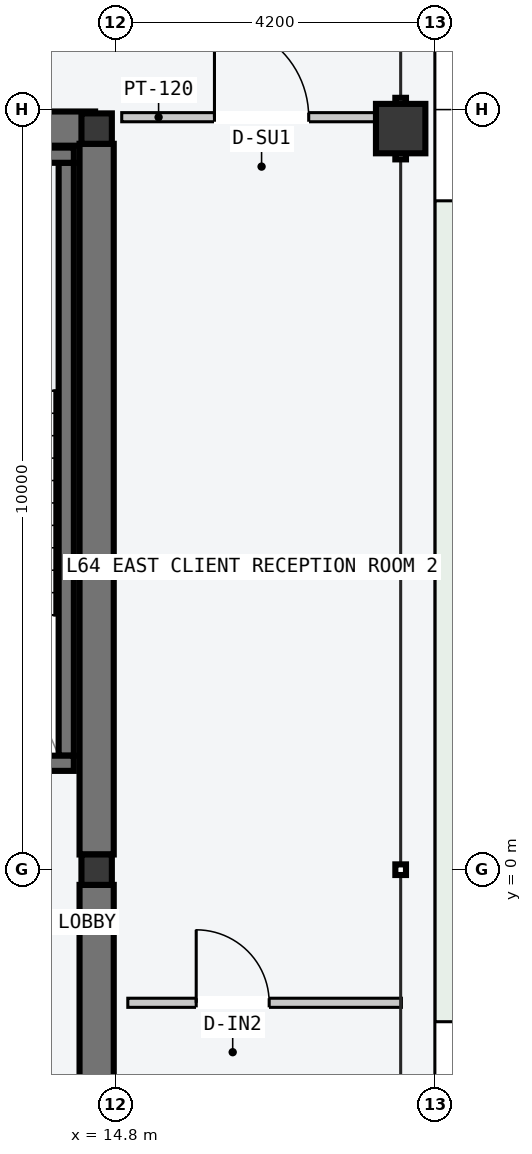
"""IFC4 building model, lengths in metres.
Left out: names, types, materials, properties, quantities, classifications, styles, units other than length and angle.
Written with IfcOpenShell. Run it as: python <this file> out.ifc"""

import sys

from ifc_helpers import new_model, si_unit, direction, frame, frame_2d, origin, origin_2d, place, context, subcontext, project, spatial, rectangle, hollow_rectangle, i_section, extrude, element, fill, save


model = new_model("IFC4")
c1 = context("Model", 3, precision=1e-05, world=origin(), true_north=direction((0.0, 1.0)))
c2 = subcontext(c1, "Body", "Model", "MODEL_VIEW")
j1 = project(units=[si_unit("LENGTHUNIT", "METRE"), si_unit("PLANEANGLEUNIT", "RADIAN")], contexts=[c1])
p1 = place(None, origin())
s1 = spatial("IfcSite", under=j1, at=p1, CompositionType="ELEMENT")
p2 = place(p1, origin())
s2 = spatial("IfcBuilding", under=s1, at=p2, CompositionType="ELEMENT")
p3 = place(p2, frame((0.0, 0.0, 243.6)))
s3 = spatial("IfcBuildingStorey", under=s2, at=p3, CompositionType="ELEMENT", Elevation=243.6)
p4 = place(p3, frame((8.07, 9.75, -0.2), z_axis=(0.0, 0.0, 1.0), x_axis=(1.0, 0.0, 0.0)))
e1 = element("IfcWall", 1, at=p4, inside=s3, PredefinedType="SHEAR", context=c2, shape_type="SweptSolid", body=[
    extrude(rectangle(XDim=6.46, YDim=0.45, at=frame_2d((3.23, 0.0))), origin(), (0.0, 0.0, 1.0), 3.6),
])
for number, where, z_axis, x_axis in (
    (2, (14.55, -9.55, -0.2), (0.0, 0.0, 1.0), (0.0, 1.0, 0.0)),
    (3, (14.55, 0.2, -0.2), (0.0, 0.0, 1.0), (0.0, 1.0, 0.0)),
):
    element("IfcWall", number, at=place(p3, frame(where, z_axis=z_axis, x_axis=x_axis)), inside=s3, PredefinedType="SHEAR", context=c2, shape_type="SweptSolid", body=[
        extrude(rectangle(XDim=9.35, YDim=0.45, at=frame_2d((4.675, 0.0))), origin(), (0.0, 0.0, 1.0), 3.6),
    ])
p5 = place(p3, frame((14.15, 1.5, -0.2), z_axis=(0.0, 0.0, 1.0), x_axis=(0.0, 1.0, 0.0)))
e4 = element("IfcWall", 4, at=p5, inside=s3, PredefinedType="SOLIDWALL", context=c2, shape_type="SweptSolid", body=[
    extrude(rectangle(XDim=7.8, YDim=0.2, at=frame_2d((3.9, 0.0))), origin(), (0.0, 0.0, 1.0), 3.6),
])
p6 = place(p3, frame((10.53, 1.4, -0.2), z_axis=(0.0, 0.0, 1.0), x_axis=(1.0, 0.0, 0.0)))
e5 = element("IfcWall", 5, at=p6, inside=s3, PredefinedType="SOLIDWALL", context=c2, shape_type="SweptSolid", body=[
    extrude(rectangle(XDim=3.72, YDim=0.2, at=frame_2d((1.86, 0.0))), origin(), (0.0, 0.0, 1.0), 3.6),
])
p7 = place(p6, frame((1.5, 0.0, 0.2)))
e6 = element("IfcOpeningElement", 6, at=p7, cuts=e5, PredefinedType="OPENING", context=c2, shape_type="SweptSolid", body=[
    extrude(rectangle(XDim=1.12, YDim=2.18, at=frame_2d((0.56, 1.09))), frame((0.0, 0.11, 0.0), z_axis=(0.0, -1.0, 0.0), x_axis=(1.0, 0.0, 0.0)), (0.0, 0.0, 1.0), 0.22),
])
p8 = place(p3, frame((10.53, 9.4, -0.2), z_axis=(0.0, 0.0, 1.0), x_axis=(1.0, 0.0, 0.0)))
e7 = element("IfcWall", 7, at=p8, inside=s3, PredefinedType="SOLIDWALL", context=c2, shape_type="SweptSolid", body=[
    extrude(rectangle(XDim=3.72, YDim=0.2, at=frame_2d((1.86, 0.0))), origin(), (0.0, 0.0, 1.0), 3.6),
])
for number, where, z_axis, x_axis in (
    (8, (14.55, 0.0, 0.0), (0.0, 0.0, 1.0), (1.0, 0.0, 0.0)),
    (9, (14.55, 9.75, 0.0), (0.0, 0.0, 1.0), (1.0, 0.0, 0.0)),
):
    element("IfcColumn", number, at=place(p3, frame(where, z_axis=z_axis, x_axis=x_axis)), inside=s3, PredefinedType="COLUMN", context=c2, shape_type="SweptSolid", body=[
        extrude(i_section(OverallWidth=0.4, OverallDepth=0.4, WebThickness=0.013, FlangeThickness=0.021, at=origin_2d()), origin(), (0.0, 0.0, 1.0), 3.6),
    ])
p9 = place(p3, frame((18.55, 9.75, 0.0), z_axis=(0.0, 0.0, 1.0), x_axis=(0.0, 1.0, 0.0)))
e10 = element("IfcColumn", 10, at=p9, inside=s3, PredefinedType="COLUMN", context=c2, shape_type="SweptSolid", body=[
    extrude(hollow_rectangle(XDim=0.65, YDim=0.65, WallThickness=0.028, at=origin_2d()), origin(), (0.0, 0.0, 1.0), 3.6),
])
p10 = place(p3, frame((14.88, 9.9, 0.0), z_axis=(0.0, 0.0, 1.0), x_axis=(1.0, 0.0, 0.0)))
e11 = element("IfcWall", 11, at=p10, inside=s3, PredefinedType="PARTITIONING", context=c2, shape_type="SweptSolid", body=[
    extrude(rectangle(XDim=3.68, YDim=0.12, at=frame_2d((1.84, 0.0))), origin(), (0.0, 0.0, 1.0), 3.4),
])
p11 = place(p10, frame((1.22, 0.0, 0.0)))
e12 = element("IfcOpeningElement", 12, at=p11, cuts=e11, PredefinedType="OPENING", context=c2, shape_type="SweptSolid", body=[
    extrude(rectangle(XDim=1.24, YDim=2.24, at=frame_2d((0.62, 1.12))), frame((0.0, 0.07, 0.0), z_axis=(0.0, -1.0, 0.0), x_axis=(1.0, 0.0, 0.0)), (0.0, 0.0, 1.0), 0.14),
])
p12 = place(p3, frame((14.96, -1.751, 0.0), z_axis=(0.0, 0.0, 1.0), x_axis=(1.0, 0.0, 0.0)))
e13 = element("IfcWall", 13, at=p12, inside=s3, PredefinedType="PARTITIONING", context=c2, shape_type="SweptSolid", body=[
    extrude(rectangle(XDim=3.6, YDim=0.12, at=frame_2d((1.8, 0.0))), origin(), (0.0, 0.0, 1.0), 3.4),
])
p13 = place(p12, frame((0.9, 0.0, 0.0)))
e14 = element("IfcOpeningElement", 14, at=p13, cuts=e13, PredefinedType="OPENING", context=c2, shape_type="SweptSolid", body=[
    extrude(rectangle(XDim=0.96, YDim=2.18, at=frame_2d((0.48, 1.09))), frame((0.0, 0.07, 0.0), z_axis=(0.0, -1.0, 0.0), x_axis=(1.0, 0.0, 0.0)), (0.0, 0.0, 1.0), 0.14),
])
p14 = place(p11, origin())
e15 = element("IfcDoor", 15, at=p14, inside=s3, OperationType="SINGLE_SWING_LEFT", PredefinedType="DOOR", context=c2, shape_type="SweptSolid", body=[
    extrude(rectangle(XDim=1.24, YDim=2.24, at=frame_2d((0.62, 1.12))), frame((0.0, 0.025, 0.0), z_axis=(0.0, -1.0, 0.0), x_axis=(1.0, 0.0, 0.0)), (0.0, 0.0, 1.0), 0.05),
])
fill(e12, e15)
p15 = place(p13, origin())
e16 = element("IfcDoor", 16, at=p15, inside=s3, OperationType="SINGLE_SWING_LEFT", PredefinedType="DOOR", context=c2, shape_type="SweptSolid", body=[
    extrude(rectangle(XDim=0.96, YDim=2.18, at=frame_2d((0.48, 1.09))), frame((0.0, 0.025, 0.0), z_axis=(0.0, -1.0, 0.0), x_axis=(1.0, 0.0, 0.0)), (0.0, 0.0, 1.0), 0.05),
])
fill(e14, e16)
save(model, sys.argv[1])
